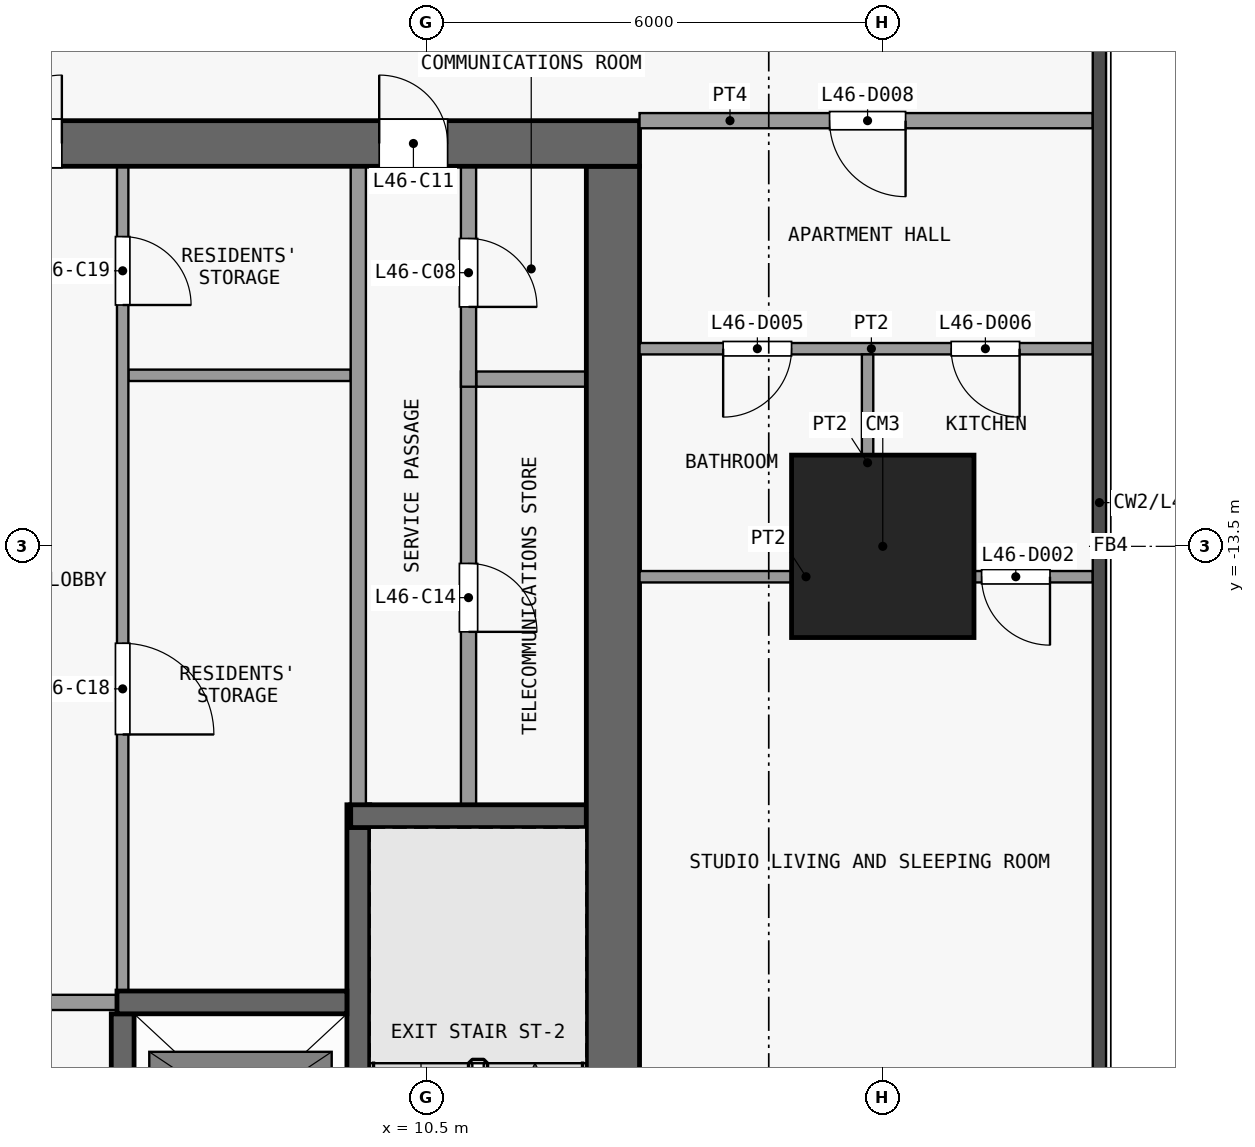
"""IFC4 building model, lengths in metres.
Left out: names, types, materials, properties, quantities, classifications, styles, units other than length and angle.
Written with IfcOpenShell. Run it as: python <this file> out.ifc"""

import sys

from ifc_helpers import new_model, si_unit, direction, frame, frame_2d, origin, origin_2d, place, context, subcontext, project, spatial, rectangle, extrude, element, fill, save


model = new_model("IFC4")
c1 = context("Model", 3, precision=1e-05, world=origin(), true_north=direction((0.0, 1.0)))
c2 = subcontext(c1, "Body", "Model", "MODEL_VIEW")
j1 = project(units=[si_unit("LENGTHUNIT", "METRE"), si_unit("PLANEANGLEUNIT", "RADIAN")], contexts=[c1])
p1 = place(None, origin())
s1 = spatial("IfcSite", under=j1, at=p1, CompositionType="ELEMENT")
p2 = place(p1, origin())
s2 = spatial("IfcBuilding", under=s1, at=p2, CompositionType="ELEMENT")
p3 = place(p2, frame((0.0, 0.0, 185.3)))
s3 = spatial("IfcBuildingStorey", under=s2, at=p3, CompositionType="ELEMENT", Elevation=185.3)
p4 = place(p3, frame((16.5, -13.5, 0.0), z_axis=(0.0, 0.0, 1.0), x_axis=(1.0, 0.0, 0.0)))
e1 = element("IfcColumn", 1, at=p4, inside=s3, PredefinedType="COLUMN", context=c2, shape_type="SweptSolid", body=[
    extrude(rectangle(XDim=2.4, YDim=2.4, at=origin_2d()), origin(), (0.0, 0.0, 1.0), 3.6),
])
p5 = place(p3, frame((-13.3, -8.2, 0.0), z_axis=(0.0, 0.0, 1.0), x_axis=(1.0, 0.0, 0.0)))
e2 = element("IfcWall", 2, at=p5, inside=s3, PredefinedType="SHEAR", context=c2, shape_type="SweptSolid", body=[
    extrude(rectangle(XDim=26.6, YDim=0.6, at=frame_2d((13.3, 0.0))), origin(), (0.0, 0.0, 1.0), 3.3),
])
p6 = place(p5, frame((7.6, 0.0, 0.0)))
e3 = element("IfcOpeningElement", 3, at=p6, cuts=e2, PredefinedType="OPENING", context=c2, shape_type="SweptSolid", body=[
    extrude(rectangle(XDim=1.8, YDim=2.1, at=frame_2d((0.9, 1.05))), frame((0.0, 0.31, 0.0), z_axis=(0.0, -1.0, 0.0), x_axis=(1.0, 0.0, 0.0)), (0.0, 0.0, 1.0), 0.62),
])
p7 = place(p5, frame((17.2, 0.0, 0.0)))
e4 = element("IfcOpeningElement", 4, at=p7, cuts=e2, PredefinedType="OPENING", context=c2, shape_type="SweptSolid", body=[
    extrude(rectangle(XDim=1.8, YDim=2.1, at=frame_2d((0.9, 1.05))), frame((0.0, 0.31, 0.0), z_axis=(0.0, -1.0, 0.0), x_axis=(1.0, 0.0, 0.0)), (0.0, 0.0, 1.0), 0.62),
])
p8 = place(p5, frame((2.525, 0.0, 0.0)))
e5 = element("IfcOpeningElement", 5, at=p8, cuts=e2, PredefinedType="OPENING", context=c2, shape_type="SweptSolid", body=[
    extrude(rectangle(XDim=0.9, YDim=2.1, at=frame_2d((0.45, 1.05))), frame((0.0, 0.31, 0.0), z_axis=(0.0, -1.0, 0.0), x_axis=(1.0, 0.0, 0.0)), (0.0, 0.0, 1.0), 0.62),
])
p9 = place(p5, frame((23.175, 0.0, 0.0)))
e6 = element("IfcOpeningElement", 6, at=p9, cuts=e2, PredefinedType="OPENING", context=c2, shape_type="SweptSolid", body=[
    extrude(rectangle(XDim=0.9, YDim=2.1, at=frame_2d((0.45, 1.05))), frame((0.0, 0.31, 0.0), z_axis=(0.0, -1.0, 0.0), x_axis=(1.0, 0.0, 0.0)), (0.0, 0.0, 1.0), 0.62),
])
p10 = place(p3, frame((12.95, -24.6, 0.0), z_axis=(0.0, 0.0, 1.0), x_axis=(0.0, 1.0, 0.0)))
e7 = element("IfcWall", 7, at=p10, inside=s3, PredefinedType="SHEAR", context=c2, shape_type="SweptSolid", body=[
    extrude(rectangle(XDim=16.1, YDim=0.7, at=frame_2d((8.05, 0.0))), origin(), (0.0, 0.0, 1.0), 3.3),
])
p11 = place(p3, frame((6.575, -19.5, 0.0), z_axis=(0.0, 0.0, 1.0), x_axis=(-1.0, 0.0, 0.0)))
e8 = element("IfcWall", 8, at=p11, inside=s3, PredefinedType="PARTITIONING", context=c2, shape_type="SweptSolid", body=[
    extrude(rectangle(XDim=3.325, YDim=0.2, at=frame_2d((1.663, 0.0))), origin(), (0.0, 0.0, 1.0), 3.3),
])
p12 = place(p11, frame((1.025, 0.0, 0.0)))
e9 = element("IfcOpeningElement", 9, at=p12, cuts=e8, PredefinedType="OPENING", context=c2, shape_type="SweptSolid", body=[
    extrude(rectangle(XDim=1.5, YDim=2.1, at=frame_2d((0.75, 1.05))), frame((0.0, 0.11, 0.0), z_axis=(0.0, -1.0, 0.0), x_axis=(1.0, 0.0, 0.0)), (0.0, 0.0, 1.0), 0.22),
])
p13 = place(p3, frame((6.425, -19.5, 0.0), z_axis=(0.0, 0.0, 1.0), x_axis=(1.0, 0.0, 0.0)))
e10 = element("IfcWall", 10, at=p13, inside=s3, PredefinedType="SHEAR", context=c2, shape_type="SweptSolid", body=[
    extrude(rectangle(XDim=3.025, YDim=0.3, at=frame_2d((1.512, 0.0))), origin(), (0.0, 0.0, 1.0), 3.3),
])
p14 = place(p3, frame((9.5, -17.05, 0.0), z_axis=(0.0, 0.0, 1.0), x_axis=(1.0, 0.0, 0.0)))
e11 = element("IfcWall", 11, at=p14, inside=s3, PredefinedType="SHEAR", context=c2, shape_type="SweptSolid", body=[
    extrude(rectangle(XDim=3.1, YDim=0.3, at=frame_2d((1.55, 0.0))), origin(), (0.0, 0.0, 1.0), 3.3),
])
p15 = place(p3, frame((11.15, -11.3, 0.0), z_axis=(0.0, 0.0, 1.0), x_axis=(1.0, 0.0, 0.0)))
e12 = element("IfcWall", 12, at=p15, inside=s3, PredefinedType="PARTITIONING", context=c2, shape_type="SweptSolid", body=[
    extrude(rectangle(XDim=1.45, YDim=0.2, at=frame_2d((0.725, 0.0))), origin(), (0.0, 0.0, 1.0), 3.3),
])
p16 = place(p3, frame((6.575, -11.25, 0.0), z_axis=(0.0, 0.0, 1.0), x_axis=(1.0, 0.0, 0.0)))
e13 = element("IfcWall", 13, at=p16, inside=s3, PredefinedType="PARTITIONING", context=c2, shape_type="SweptSolid", body=[
    extrude(rectangle(XDim=2.925, YDim=0.15, at=frame_2d((1.462, 0.0))), origin(), (0.0, 0.0, 1.0), 3.3),
])
p17 = place(p3, frame((6.5, -22.25, 0.0), z_axis=(0.0, 0.0, 1.0), x_axis=(0.0, 1.0, 0.0)))
e14 = element("IfcWall", 14, at=p17, inside=s3, PredefinedType="SHEAR", context=c2, shape_type="SweptSolid", body=[
    extrude(rectangle(XDim=2.6, YDim=0.3, at=frame_2d((1.3, 0.0))), origin(), (0.0, 0.0, 1.0), 3.3),
])
p18 = place(p17, frame((0.75, 0.0, 0.0)))
e15 = element("IfcOpeningElement", 15, at=p18, cuts=e14, PredefinedType="OPENING", context=c2, shape_type="SweptSolid", body=[
    extrude(rectangle(XDim=1.1, YDim=2.1, at=frame_2d((0.55, 1.05))), frame((0.0, 0.16, 0.0), z_axis=(0.0, -1.0, 0.0), x_axis=(1.0, 0.0, 0.0)), (0.0, 0.0, 1.0), 0.32),
])
p19 = place(p3, frame((6.5, -8.5, 0.0), z_axis=(0.0, 0.0, 1.0), x_axis=(0.0, -1.0, 0.0)))
e16 = element("IfcWall", 16, at=p19, inside=s3, PredefinedType="PARTITIONING", context=c2, shape_type="SweptSolid", body=[
    extrude(rectangle(XDim=10.85, YDim=0.15, at=frame_2d((5.425, 0.0))), origin(), (0.0, 0.0, 1.0), 3.3),
])
p20 = place(p19, frame((6.275, 0.0, 0.0)))
e17 = element("IfcOpeningElement", 17, at=p20, cuts=e16, PredefinedType="OPENING", context=c2, shape_type="SweptSolid", body=[
    extrude(rectangle(XDim=1.2, YDim=2.1, at=frame_2d((0.6, 1.05))), frame((0.0, 0.085, 0.0), z_axis=(0.0, -1.0, 0.0), x_axis=(1.0, 0.0, 0.0)), (0.0, 0.0, 1.0), 0.17),
])
p21 = place(p19, frame((0.925, 0.0, 0.0)))
e18 = element("IfcOpeningElement", 18, at=p21, cuts=e16, PredefinedType="OPENING", context=c2, shape_type="SweptSolid", body=[
    extrude(rectangle(XDim=0.9, YDim=2.1, at=frame_2d((0.45, 1.05))), frame((0.0, 0.085, 0.0), z_axis=(0.0, -1.0, 0.0), x_axis=(1.0, 0.0, 0.0)), (0.0, 0.0, 1.0), 0.17),
])
p22 = place(p3, frame((9.6, -16.9, 0.0), z_axis=(0.0, 0.0, 1.0), x_axis=(0.0, -1.0, 0.0)))
e19 = element("IfcWall", 19, at=p22, inside=s3, PredefinedType="SHEAR", context=c2, shape_type="SweptSolid", body=[
    extrude(rectangle(XDim=7.7, YDim=0.3, at=frame_2d((3.85, 0.0))), origin(), (0.0, 0.0, 1.0), 3.3),
])
p23 = place(p22, frame((6.5, 0.0, 0.0)))
e20 = element("IfcOpeningElement", 20, at=p23, cuts=e19, PredefinedType="OPENING", context=c2, shape_type="SweptSolid", body=[
    extrude(rectangle(XDim=1.1, YDim=2.1, at=frame_2d((0.55, 1.05))), frame((0.0, 0.16, 0.0), z_axis=(0.0, -1.0, 0.0), x_axis=(1.0, 0.0, 0.0)), (0.0, 0.0, 1.0), 0.32),
])
p24 = place(p3, frame((9.6, -16.9, 0.0), z_axis=(0.0, 0.0, 1.0), x_axis=(0.0, 1.0, 0.0)))
e21 = element("IfcWall", 21, at=p24, inside=s3, PredefinedType="PARTITIONING", context=c2, shape_type="SweptSolid", body=[
    extrude(rectangle(XDim=8.4, YDim=0.2, at=frame_2d((4.2, 0.0))), origin(), (0.0, 0.0, 1.0), 3.3),
])
p25 = place(p3, frame((11.05, -11.2, 0.0), z_axis=(0.0, 0.0, 1.0), x_axis=(0.0, -1.0, 0.0)))
e22 = element("IfcWall", 22, at=p25, inside=s3, PredefinedType="PARTITIONING", context=c2, shape_type="SweptSolid", body=[
    extrude(rectangle(XDim=5.7, YDim=0.2, at=frame_2d((2.85, 0.0))), origin(), (0.0, 0.0, 1.0), 3.3),
])
p26 = place(p25, frame((2.525, 0.0, 0.0)))
e23 = element("IfcOpeningElement", 23, at=p26, cuts=e22, PredefinedType="OPENING", context=c2, shape_type="SweptSolid", body=[
    extrude(rectangle(XDim=0.9, YDim=2.1, at=frame_2d((0.45, 1.05))), frame((0.0, 0.11, 0.0), z_axis=(0.0, -1.0, 0.0), x_axis=(1.0, 0.0, 0.0)), (0.0, 0.0, 1.0), 0.22),
])
p27 = place(p3, frame((11.05, -8.5, 0.0), z_axis=(0.0, 0.0, 1.0), x_axis=(0.0, -1.0, 0.0)))
e24 = element("IfcWall", 24, at=p27, inside=s3, PredefinedType="PARTITIONING", context=c2, shape_type="SweptSolid", body=[
    extrude(rectangle(XDim=2.9, YDim=0.2, at=frame_2d((1.45, 0.0))), origin(), (0.0, 0.0, 1.0), 3.3),
])
p28 = place(p27, frame((0.95, 0.0, 0.0)))
e25 = element("IfcOpeningElement", 25, at=p28, cuts=e24, PredefinedType="OPENING", context=c2, shape_type="SweptSolid", body=[
    extrude(rectangle(XDim=0.9, YDim=2.1, at=frame_2d((0.45, 1.05))), frame((0.0, 0.11, 0.0), z_axis=(0.0, -1.0, 0.0), x_axis=(1.0, 0.0, 0.0)), (0.0, 0.0, 1.0), 0.22),
])
p29 = place(p3, frame((13.3, -13.9, 0.0), z_axis=(0.0, 0.0, 1.0), x_axis=(1.0, 0.0, 0.0)))
e26 = element("IfcWall", 26, at=p29, inside=s3, PredefinedType="PARTITIONING", context=c2, shape_type="SweptSolid", body=[
    extrude(rectangle(XDim=5.962, YDim=0.15, at=frame_2d((2.981, 0.0))), origin(), (0.0, 0.0, 1.0), 3.3),
])
p30 = place(p29, frame((4.5, 0.0, 0.0)))
e27 = element("IfcOpeningElement", 27, at=p30, cuts=e26, PredefinedType="OPENING", context=c2, shape_type="SweptSolid", body=[
    extrude(rectangle(XDim=0.9, YDim=2.1, at=frame_2d((0.45, 1.05))), frame((0.0, 0.085, 0.0), z_axis=(0.0, -1.0, 0.0), x_axis=(1.0, 0.0, 0.0)), (0.0, 0.0, 1.0), 0.17),
])
p31 = place(p3, frame((13.3, -10.9, 0.0), z_axis=(0.0, 0.0, 1.0), x_axis=(1.0, 0.0, 0.0)))
e28 = element("IfcWall", 28, at=p31, inside=s3, PredefinedType="PARTITIONING", context=c2, shape_type="SweptSolid", body=[
    extrude(rectangle(XDim=5.962, YDim=0.15, at=frame_2d((2.981, 0.0))), origin(), (0.0, 0.0, 1.0), 3.3),
])
p32 = place(p31, frame((1.1, 0.0, 0.0)))
e29 = element("IfcOpeningElement", 29, at=p32, cuts=e28, PredefinedType="OPENING", context=c2, shape_type="SweptSolid", body=[
    extrude(rectangle(XDim=0.9, YDim=2.1, at=frame_2d((0.45, 1.05))), frame((0.0, 0.085, 0.0), z_axis=(0.0, -1.0, 0.0), x_axis=(1.0, 0.0, 0.0)), (0.0, 0.0, 1.0), 0.17),
])
p33 = place(p31, frame((4.1, 0.0, 0.0)))
e30 = element("IfcOpeningElement", 30, at=p33, cuts=e28, PredefinedType="OPENING", context=c2, shape_type="SweptSolid", body=[
    extrude(rectangle(XDim=0.9, YDim=2.1, at=frame_2d((0.45, 1.05))), frame((0.0, 0.085, 0.0), z_axis=(0.0, -1.0, 0.0), x_axis=(1.0, 0.0, 0.0)), (0.0, 0.0, 1.0), 0.17),
])
p34 = place(p3, frame((13.3, -7.9, 0.0), z_axis=(0.0, 0.0, 1.0), x_axis=(1.0, 0.0, 0.0)))
e31 = element("IfcWall", 31, at=p34, inside=s3, PredefinedType="PARTITIONING", context=c2, shape_type="SweptSolid", body=[
    extrude(rectangle(XDim=5.962, YDim=0.2, at=frame_2d((2.981, 0.0))), origin(), (0.0, 0.0, 1.0), 3.3),
])
p35 = place(p34, frame((2.5, 0.0, 0.0)))
e32 = element("IfcOpeningElement", 32, at=p35, cuts=e31, PredefinedType="OPENING", context=c2, shape_type="SweptSolid", body=[
    extrude(rectangle(XDim=1.0, YDim=2.1, at=frame_2d((0.5, 1.05))), frame((0.0, 0.11, 0.0), z_axis=(0.0, -1.0, 0.0), x_axis=(1.0, 0.0, 0.0)), (0.0, 0.0, 1.0), 0.22),
])
p36 = place(p3, frame((16.3, -13.825, 0.0), z_axis=(0.0, 0.0, 1.0), x_axis=(0.0, 1.0, 0.0)))
e33 = element("IfcWall", 33, at=p36, inside=s3, PredefinedType="PARTITIONING", context=c2, shape_type="SweptSolid", body=[
    extrude(rectangle(XDim=2.85, YDim=0.15, at=frame_2d((1.425, 0.0))), origin(), (0.0, 0.0, 1.0), 3.3),
])
p37 = place(p7, origin())
e34 = element("IfcDoor", 34, at=p37, inside=s3, OperationType="DOUBLE_DOOR_SINGLE_SWING", PredefinedType="DOOR", context=c2, shape_type="SweptSolid", body=[
    extrude(rectangle(XDim=1.8, YDim=2.1, at=frame_2d((0.9, 1.05))), frame((0.0, 0.025, 0.0), z_axis=(0.0, -1.0, 0.0), x_axis=(1.0, 0.0, 0.0)), (0.0, 0.0, 1.0), 0.05),
])
fill(e4, e34)
p38 = place(p28, origin())
e35 = element("IfcDoor", 35, at=p38, inside=s3, OperationType="SINGLE_SWING_RIGHT", PredefinedType="DOOR", context=c2, shape_type="SweptSolid", body=[
    extrude(rectangle(XDim=0.9, YDim=2.1, at=frame_2d((0.45, 1.05))), frame((0.0, 0.025, 0.0), z_axis=(0.0, -1.0, 0.0), x_axis=(1.0, 0.0, 0.0)), (0.0, 0.0, 1.0), 0.05),
])
fill(e25, e35)
p39 = place(p9, origin())
e36 = element("IfcDoor", 36, at=p39, inside=s3, OperationType="SINGLE_SWING_LEFT", PredefinedType="DOOR", context=c2, shape_type="SweptSolid", body=[
    extrude(rectangle(XDim=0.9, YDim=2.1, at=frame_2d((0.45, 1.05))), frame((0.0, 0.025, 0.0), z_axis=(0.0, -1.0, 0.0), x_axis=(1.0, 0.0, 0.0)), (0.0, 0.0, 1.0), 0.05),
])
fill(e6, e36)
p40 = place(p26, origin())
e37 = element("IfcDoor", 37, at=p40, inside=s3, OperationType="SINGLE_SWING_RIGHT", PredefinedType="DOOR", context=c2, shape_type="SweptSolid", body=[
    extrude(rectangle(XDim=0.9, YDim=2.1, at=frame_2d((0.45, 1.05))), frame((0.0, 0.025, 0.0), z_axis=(0.0, -1.0, 0.0), x_axis=(1.0, 0.0, 0.0)), (0.0, 0.0, 1.0), 0.05),
])
fill(e23, e37)
p41 = place(p20, origin())
e38 = element("IfcDoor", 38, at=p41, inside=s3, OperationType="SINGLE_SWING_RIGHT", PredefinedType="DOOR", context=c2, shape_type="SweptSolid", body=[
    extrude(rectangle(XDim=1.2, YDim=2.1, at=frame_2d((0.6, 1.05))), frame((0.0, 0.025, 0.0), z_axis=(0.0, -1.0, 0.0), x_axis=(1.0, 0.0, 0.0)), (0.0, 0.0, 1.0), 0.05),
])
fill(e17, e38)
p42 = place(p21, origin())
e39 = element("IfcDoor", 39, at=p42, inside=s3, OperationType="SINGLE_SWING_RIGHT", PredefinedType="DOOR", context=c2, shape_type="SweptSolid", body=[
    extrude(rectangle(XDim=0.9, YDim=2.1, at=frame_2d((0.45, 1.05))), frame((0.0, 0.025, 0.0), z_axis=(0.0, -1.0, 0.0), x_axis=(1.0, 0.0, 0.0)), (0.0, 0.0, 1.0), 0.05),
])
fill(e18, e39)
p43 = place(p30, origin())
e40 = element("IfcDoor", 40, at=p43, inside=s3, OperationType="SINGLE_SWING_RIGHT", PredefinedType="DOOR", context=c2, shape_type="SweptSolid", body=[
    extrude(rectangle(XDim=0.9, YDim=2.1, at=frame_2d((0.45, 1.05))), frame((0.0, 0.025, 0.0), z_axis=(0.0, -1.0, 0.0), x_axis=(1.0, 0.0, 0.0)), (0.0, 0.0, 1.0), 0.05),
])
fill(e27, e40)
p44 = place(p32, origin())
e41 = element("IfcDoor", 41, at=p44, inside=s3, OperationType="SINGLE_SWING_LEFT", PredefinedType="DOOR", context=c2, shape_type="SweptSolid", body=[
    extrude(rectangle(XDim=0.9, YDim=2.1, at=frame_2d((0.45, 1.05))), frame((0.0, 0.025, 0.0), z_axis=(0.0, -1.0, 0.0), x_axis=(1.0, 0.0, 0.0)), (0.0, 0.0, 1.0), 0.05),
])
fill(e29, e41)
p45 = place(p33, origin())
e42 = element("IfcDoor", 42, at=p45, inside=s3, OperationType="SINGLE_SWING_RIGHT", PredefinedType="DOOR", context=c2, shape_type="SweptSolid", body=[
    extrude(rectangle(XDim=0.9, YDim=2.1, at=frame_2d((0.45, 1.05))), frame((0.0, 0.025, 0.0), z_axis=(0.0, -1.0, 0.0), x_axis=(1.0, 0.0, 0.0)), (0.0, 0.0, 1.0), 0.05),
])
fill(e30, e42)
p46 = place(p35, origin())
e43 = element("IfcDoor", 43, at=p46, inside=s3, OperationType="SINGLE_SWING_RIGHT", PredefinedType="DOOR", context=c2, shape_type="SweptSolid", body=[
    extrude(rectangle(XDim=1.0, YDim=2.1, at=frame_2d((0.5, 1.05))), frame((0.0, 0.025, 0.0), z_axis=(0.0, -1.0, 0.0), x_axis=(1.0, 0.0, 0.0)), (0.0, 0.0, 1.0), 0.05),
])
fill(e32, e43)
save(model, sys.argv[1])
